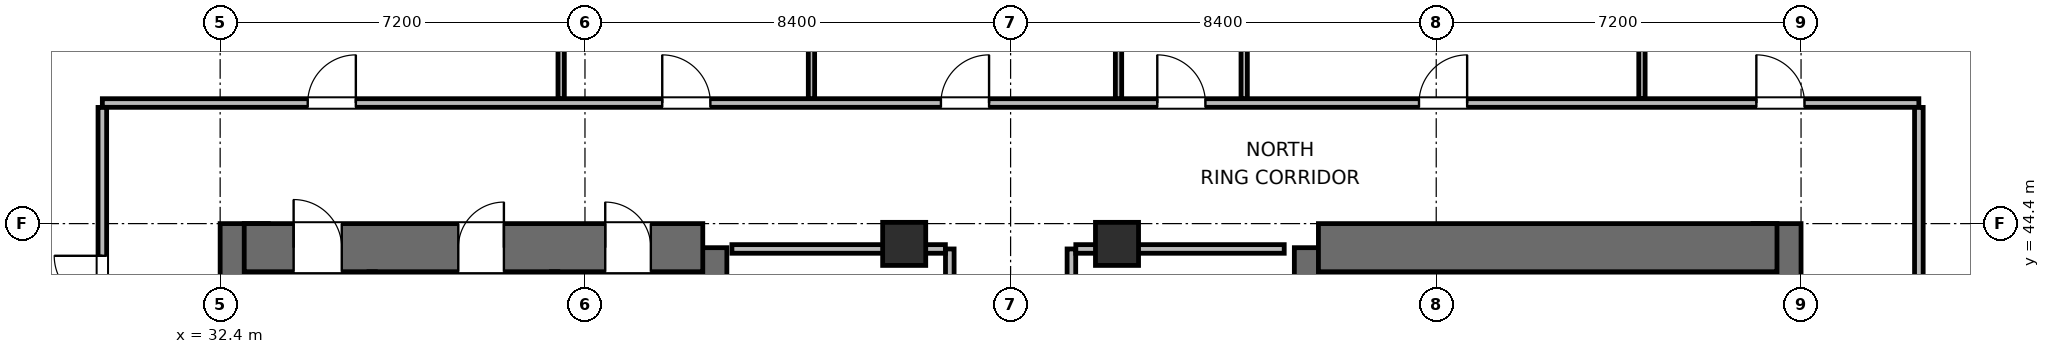
"""IFC4 building model, lengths in metres.
Left out: names, types, materials, properties, quantities, classifications, styles, units other than length and angle.
Written with IfcOpenShell. Run it as: python <this file> out.ifc"""

import sys

from ifc_helpers import new_model, si_unit, direction, frame, frame_2d, origin, origin_2d, place, context, subcontext, project, spatial, rectangle, extrude, element, fill, save


model = new_model("IFC4")
c1 = context("Model", 3, precision=1e-05, world=origin(), true_north=direction((0.0, 1.0)))
c2 = subcontext(c1, "Body", "Model", "MODEL_VIEW")
j1 = project(units=[si_unit("LENGTHUNIT", "METRE"), si_unit("PLANEANGLEUNIT", "RADIAN")], contexts=[c1])
p1 = place(None, origin())
s1 = spatial("IfcSite", under=j1, at=p1, CompositionType="ELEMENT")
p2 = place(p1, origin())
s2 = spatial("IfcBuilding", under=s1, at=p2, CompositionType="ELEMENT")
p3 = place(p2, frame((0.0, 0.0, 37.2)))
s3 = spatial("IfcBuildingStorey", under=s2, at=p3, CompositionType="ELEMENT", Elevation=37.2)
p4 = place(p3, frame((32.875, 27.6, 0.0), z_axis=(0.0, 0.0, 1.0), x_axis=(0.0, 1.0, 0.0)))
e1 = element("IfcWall", 1, at=p4, inside=s3, PredefinedType="SHEAR", context=c2, shape_type="SweptSolid", body=[
    extrude(rectangle(XDim=16.8, YDim=0.95, at=frame_2d((8.4, 0.0))), origin(), (0.0, 0.0, 1.0), 3.9),
])
p5 = place(p3, frame((41.925, 37.8, 0.0), z_axis=(0.0, 0.0, 1.0), x_axis=(0.0, 1.0, 0.0)))
e2 = element("IfcWall", 2, at=p5, inside=s3, PredefinedType="SHEAR", context=c2, shape_type="SweptSolid", body=[
    extrude(rectangle(XDim=6.125, YDim=0.95, at=frame_2d((3.062, 0.0))), origin(), (0.0, 0.0, 1.0), 3.9),
])
p6 = place(p3, frame((32.875, 43.925, 0.0), z_axis=(0.0, 0.0, 1.0), x_axis=(1.0, 0.0, 0.0)))
e3 = element("IfcWall", 3, at=p6, inside=s3, PredefinedType="SHEAR", context=c2, shape_type="SweptSolid", body=[
    extrude(rectangle(XDim=9.05, YDim=0.95, at=frame_2d((4.525, 0.0))), origin(), (0.0, 0.0, 1.0), 3.9),
])
p7 = place(p6, frame((0.975, 0.0, 0.0)))
e4 = element("IfcOpeningElement", 4, at=p7, cuts=e3, PredefinedType="OPENING", context=c2, shape_type="SweptSolid", body=[
    extrude(rectangle(XDim=0.95, YDim=2.04, at=frame_2d((0.475, 1.02))), frame((0.0, 0.485, 0.0), z_axis=(0.0, -1.0, 0.0), x_axis=(1.0, 0.0, 0.0)), (0.0, 0.0, 1.0), 0.97),
])
p8 = place(p6, frame((4.225, 0.0, 0.0)))
e5 = element("IfcOpeningElement", 5, at=p8, cuts=e3, PredefinedType="OPENING", context=c2, shape_type="SweptSolid", body=[
    extrude(rectangle(XDim=0.9, YDim=2.02, at=frame_2d((0.45, 1.01))), frame((0.0, 0.485, 0.0), z_axis=(0.0, -1.0, 0.0), x_axis=(1.0, 0.0, 0.0)), (0.0, 0.0, 1.0), 0.97),
])
p9 = place(p6, frame((7.125, 0.0, 0.0)))
e6 = element("IfcOpeningElement", 6, at=p9, cuts=e3, PredefinedType="OPENING", context=c2, shape_type="SweptSolid", body=[
    extrude(rectangle(XDim=0.9, YDim=2.02, at=frame_2d((0.45, 1.01))), frame((0.0, 0.485, 0.0), z_axis=(0.0, -1.0, 0.0), x_axis=(1.0, 0.0, 0.0)), (0.0, 0.0, 1.0), 0.97),
])
p10 = place(p3, frame((54.075, 38.0, 0.0), z_axis=(0.0, 0.0, 1.0), x_axis=(0.0, 1.0, 0.0)))
e7 = element("IfcWall", 7, at=p10, inside=s3, PredefinedType="SHEAR", context=c2, shape_type="SweptSolid", body=[
    extrude(rectangle(XDim=5.925, YDim=0.95, at=frame_2d((2.962, 0.0))), origin(), (0.0, 0.0, 1.0), 3.9),
])
p11 = place(p3, frame((63.125, 27.6, 0.0), z_axis=(0.0, 0.0, 1.0), x_axis=(0.0, 1.0, 0.0)))
e8 = element("IfcWall", 8, at=p11, inside=s3, PredefinedType="SHEAR", context=c2, shape_type="SweptSolid", body=[
    extrude(rectangle(XDim=16.8, YDim=0.95, at=frame_2d((8.4, 0.0))), origin(), (0.0, 0.0, 1.0), 3.9),
])
p12 = place(p3, frame((54.075, 43.925, 0.0), z_axis=(0.0, 0.0, 1.0), x_axis=(1.0, 0.0, 0.0)))
e9 = element("IfcWall", 9, at=p12, inside=s3, PredefinedType="SHEAR", context=c2, shape_type="SweptSolid", body=[
    extrude(rectangle(XDim=9.05, YDim=0.95, at=frame_2d((4.525, 0.0))), origin(), (0.0, 0.0, 1.0), 3.9),
])
for number, where, z_axis, x_axis in (
    (10, (45.9, 44.0, 0.0), (0.0, 0.0, 1.0), (1.0, 0.0, 0.0)),
    (11, (50.1, 44.0, 0.0), (0.0, 0.0, 1.0), (1.0, 0.0, 0.0)),
):
    element("IfcColumn", number, at=place(p3, frame(where, z_axis=z_axis, x_axis=x_axis)), inside=s3, PredefinedType="COLUMN", context=c2, shape_type="SweptSolid", body=[
        extrude(rectangle(XDim=0.85, YDim=0.85, at=origin_2d()), origin(), (0.0, 0.0, 1.0), 3.9),
    ])
for number, where, z_axis, x_axis in (
    (12, (35.4, 41.095, 0.0), (0.0, 0.0, 1.0), (0.0, 1.0, 0.0)),
    (13, (39.0, 41.095, 0.0), (0.0, 0.0, 1.0), (0.0, 1.0, 0.0)),
):
    element("IfcWall", number, at=place(p3, frame(where, z_axis=z_axis, x_axis=x_axis)), inside=s3, PredefinedType="PARTITIONING", context=c2, shape_type="SweptSolid", body=[
        extrude(rectangle(XDim=2.355, YDim=0.125, at=frame_2d((1.177, 0.0))), origin(), (0.0, 0.0, 1.0), 3.64),
    ])
p13 = place(p3, frame((46.8, 37.9, 0.0), z_axis=(0.0, 0.0, 1.0), x_axis=(0.0, 1.0, 0.0)))
e14 = element("IfcWall", 14, at=p13, inside=s3, PredefinedType="PARTITIONING", context=c2, shape_type="SweptSolid", body=[
    extrude(rectangle(XDim=6.0, YDim=0.17, at=frame_2d((3.0, 0.0))), origin(), (0.0, 0.0, 1.0), 3.64),
])
p14 = place(p13, frame((0.54, 0.0, 0.0)))
e15 = element("IfcOpeningElement", 15, at=p14, cuts=e14, PredefinedType="OPENING", context=c2, shape_type="SweptSolid", body=[
    extrude(rectangle(XDim=0.9, YDim=2.02, at=frame_2d((0.45, 1.01))), frame((0.0, 0.095, 0.0), z_axis=(0.0, -1.0, 0.0), x_axis=(1.0, 0.0, 0.0)), (0.0, 0.0, 1.0), 0.19),
])
p15 = place(p13, frame((2.55, 0.0, 0.0)))
e16 = element("IfcOpeningElement", 16, at=p15, cuts=e14, PredefinedType="OPENING", context=c2, shape_type="SweptSolid", body=[
    extrude(rectangle(XDim=0.9, YDim=2.02, at=frame_2d((0.45, 1.01))), frame((0.0, 0.095, 0.0), z_axis=(0.0, -1.0, 0.0), x_axis=(1.0, 0.0, 0.0)), (0.0, 0.0, 1.0), 0.19),
])
p16 = place(p13, frame((4.56, 0.0, 0.0)))
e17 = element("IfcOpeningElement", 17, at=p16, cuts=e14, PredefinedType="OPENING", context=c2, shape_type="SweptSolid", body=[
    extrude(rectangle(XDim=0.9, YDim=2.02, at=frame_2d((0.45, 1.01))), frame((0.0, 0.095, 0.0), z_axis=(0.0, -1.0, 0.0), x_axis=(1.0, 0.0, 0.0)), (0.0, 0.0, 1.0), 0.19),
])
p17 = place(p3, frame((42.5, 43.9, 0.0), z_axis=(0.0, 0.0, 1.0), x_axis=(1.0, 0.0, 0.0)))
e18 = element("IfcWall", 18, at=p17, inside=s3, PredefinedType="PARTITIONING", context=c2, shape_type="SweptSolid", body=[
    extrude(rectangle(XDim=4.213, YDim=0.17, at=frame_2d((2.106, 0.0))), origin(), (0.0, 0.0, 1.0), 2.525),
])
p18 = place(p3, frame((49.2, 37.9, 0.0), z_axis=(0.0, 0.0, 1.0), x_axis=(0.0, 1.0, 0.0)))
e19 = element("IfcWall", 19, at=p18, inside=s3, PredefinedType="PARTITIONING", context=c2, shape_type="SweptSolid", body=[
    extrude(rectangle(XDim=6.0, YDim=0.17, at=frame_2d((3.0, 0.0))), origin(), (0.0, 0.0, 1.0), 3.64),
])
p19 = place(p18, frame((0.69, 0.0, 0.0)))
e20 = element("IfcOpeningElement", 20, at=p19, cuts=e19, PredefinedType="OPENING", context=c2, shape_type="SweptSolid", body=[
    extrude(rectangle(XDim=0.9, YDim=2.02, at=frame_2d((0.45, 1.01))), frame((0.0, 0.095, 0.0), z_axis=(0.0, -1.0, 0.0), x_axis=(1.0, 0.0, 0.0)), (0.0, 0.0, 1.0), 0.19),
])
p20 = place(p18, frame((3.69, 0.0, 0.0)))
e21 = element("IfcOpeningElement", 21, at=p20, cuts=e19, PredefinedType="OPENING", context=c2, shape_type="SweptSolid", body=[
    extrude(rectangle(XDim=0.9, YDim=2.02, at=frame_2d((0.45, 1.01))), frame((0.0, 0.095, 0.0), z_axis=(0.0, -1.0, 0.0), x_axis=(1.0, 0.0, 0.0)), (0.0, 0.0, 1.0), 0.19),
])
p21 = place(p3, frame((49.287, 43.9, 0.0), z_axis=(0.0, 0.0, 1.0), x_axis=(1.0, 0.0, 0.0)))
e22 = element("IfcWall", 22, at=p21, inside=s3, PredefinedType="PARTITIONING", context=c2, shape_type="SweptSolid", body=[
    extrude(rectangle(XDim=4.113, YDim=0.17, at=frame_2d((2.056, 0.0))), origin(), (0.0, 0.0, 1.0), 2.525),
])
p22 = place(p3, frame((30.075, 46.78, 0.0), z_axis=(0.0, 0.0, 1.0), x_axis=(1.0, 0.0, 0.0)))
e23 = element("IfcWall", 23, at=p22, inside=s3, PredefinedType="PARTITIONING", context=c2, shape_type="SweptSolid", body=[
    extrude(rectangle(XDim=35.85, YDim=0.17, at=frame_2d((17.925, 0.0))), origin(), (0.0, 0.0, 1.0), 3.64),
])
p23 = place(p22, frame((4.053, 0.0, 0.0)))
e24 = element("IfcOpeningElement", 24, at=p23, cuts=e23, PredefinedType="OPENING", context=c2, shape_type="SweptSolid", body=[
    extrude(rectangle(XDim=0.95, YDim=2.04, at=frame_2d((0.475, 1.02))), frame((0.0, 0.095, 0.0), z_axis=(0.0, -1.0, 0.0), x_axis=(1.0, 0.0, 0.0)), (0.0, 0.0, 1.0), 0.19),
])
p24 = place(p22, frame((11.05, 0.0, 0.0)))
e25 = element("IfcOpeningElement", 25, at=p24, cuts=e23, PredefinedType="OPENING", context=c2, shape_type="SweptSolid", body=[
    extrude(rectangle(XDim=0.95, YDim=2.04, at=frame_2d((0.475, 1.02))), frame((0.0, 0.095, 0.0), z_axis=(0.0, -1.0, 0.0), x_axis=(1.0, 0.0, 0.0)), (0.0, 0.0, 1.0), 0.19),
])
p25 = place(p22, frame((16.55, 0.0, 0.0)))
e26 = element("IfcOpeningElement", 26, at=p25, cuts=e23, PredefinedType="OPENING", context=c2, shape_type="SweptSolid", body=[
    extrude(rectangle(XDim=0.95, YDim=2.04, at=frame_2d((0.475, 1.02))), frame((0.0, 0.095, 0.0), z_axis=(0.0, -1.0, 0.0), x_axis=(1.0, 0.0, 0.0)), (0.0, 0.0, 1.0), 0.19),
])
p26 = place(p22, frame((20.82, 0.0, 0.0)))
e27 = element("IfcOpeningElement", 27, at=p26, cuts=e23, PredefinedType="OPENING", context=c2, shape_type="SweptSolid", body=[
    extrude(rectangle(XDim=0.95, YDim=2.04, at=frame_2d((0.475, 1.02))), frame((0.0, 0.095, 0.0), z_axis=(0.0, -1.0, 0.0), x_axis=(1.0, 0.0, 0.0)), (0.0, 0.0, 1.0), 0.19),
])
p27 = place(p22, frame((25.985, 0.0, 0.0)))
e28 = element("IfcOpeningElement", 28, at=p27, cuts=e23, PredefinedType="OPENING", context=c2, shape_type="SweptSolid", body=[
    extrude(rectangle(XDim=0.95, YDim=2.04, at=frame_2d((0.475, 1.02))), frame((0.0, 0.095, 0.0), z_axis=(0.0, -1.0, 0.0), x_axis=(1.0, 0.0, 0.0)), (0.0, 0.0, 1.0), 0.19),
])
p28 = place(p22, frame((32.643, 0.0, 0.0)))
e29 = element("IfcOpeningElement", 29, at=p28, cuts=e23, PredefinedType="OPENING", context=c2, shape_type="SweptSolid", body=[
    extrude(rectangle(XDim=0.95, YDim=2.04, at=frame_2d((0.475, 1.02))), frame((0.0, 0.095, 0.0), z_axis=(0.0, -1.0, 0.0), x_axis=(1.0, 0.0, 0.0)), (0.0, 0.0, 1.0), 0.19),
])
p29 = place(p3, frame((30.075, 25.307, 0.0), z_axis=(0.0, 0.0, 1.0), x_axis=(0.0, 1.0, 0.0)))
e30 = element("IfcWall", 30, at=p29, inside=s3, PredefinedType="PARTITIONING", context=c2, shape_type="SweptSolid", body=[
    extrude(rectangle(XDim=21.386, YDim=0.17, at=frame_2d((10.693, 0.0))), origin(), (0.0, 0.0, 1.0), 3.64),
])
p30 = place(p29, frame((3.528, 0.0, 0.0)))
e31 = element("IfcOpeningElement", 31, at=p30, cuts=e30, PredefinedType="OPENING", context=c2, shape_type="SweptSolid", body=[
    extrude(rectangle(XDim=0.95, YDim=2.04, at=frame_2d((0.475, 1.02))), frame((0.0, 0.095, 0.0), z_axis=(0.0, -1.0, 0.0), x_axis=(1.0, 0.0, 0.0)), (0.0, 0.0, 1.0), 0.19),
])
p31 = place(p29, frame((10.818, 0.0, 0.0)))
e32 = element("IfcOpeningElement", 32, at=p31, cuts=e30, PredefinedType="OPENING", context=c2, shape_type="SweptSolid", body=[
    extrude(rectangle(XDim=0.95, YDim=2.04, at=frame_2d((0.475, 1.02))), frame((0.0, 0.095, 0.0), z_axis=(0.0, -1.0, 0.0), x_axis=(1.0, 0.0, 0.0)), (0.0, 0.0, 1.0), 0.19),
])
p32 = place(p29, frame((17.508, 0.0, 0.0)))
e33 = element("IfcOpeningElement", 33, at=p32, cuts=e30, PredefinedType="OPENING", context=c2, shape_type="SweptSolid", body=[
    extrude(rectangle(XDim=0.95, YDim=2.04, at=frame_2d((0.475, 1.02))), frame((0.0, 0.095, 0.0), z_axis=(0.0, -1.0, 0.0), x_axis=(1.0, 0.0, 0.0)), (0.0, 0.0, 1.0), 0.19),
])
p33 = place(p3, frame((65.925, 25.307, 0.0), z_axis=(0.0, 0.0, 1.0), x_axis=(0.0, 1.0, 0.0)))
e34 = element("IfcWall", 34, at=p33, inside=s3, PredefinedType="PARTITIONING", context=c2, shape_type="SweptSolid", body=[
    extrude(rectangle(XDim=21.386, YDim=0.17, at=frame_2d((10.693, 0.0))), origin(), (0.0, 0.0, 1.0), 3.64),
])
p34 = place(p33, frame((5.428, 0.0, 0.0)))
e35 = element("IfcOpeningElement", 35, at=p34, cuts=e34, PredefinedType="OPENING", context=c2, shape_type="SweptSolid", body=[
    extrude(rectangle(XDim=0.95, YDim=2.04, at=frame_2d((0.475, 1.02))), frame((0.0, 0.095, 0.0), z_axis=(0.0, -1.0, 0.0), x_axis=(1.0, 0.0, 0.0)), (0.0, 0.0, 1.0), 0.19),
])
p35 = place(p33, frame((16.208, 0.0, 0.0)))
e36 = element("IfcOpeningElement", 36, at=p35, cuts=e34, PredefinedType="OPENING", context=c2, shape_type="SweptSolid", body=[
    extrude(rectangle(XDim=0.95, YDim=2.04, at=frame_2d((0.475, 1.02))), frame((0.0, 0.095, 0.0), z_axis=(0.0, -1.0, 0.0), x_axis=(1.0, 0.0, 0.0)), (0.0, 0.0, 1.0), 0.19),
])
p36 = place(p3, frame((39.13, 46.867, 0.0), z_axis=(0.0, 0.0, 1.0), x_axis=(0.0, 1.0, 0.0)))
e37 = element("IfcWall", 37, at=p36, inside=s3, PredefinedType="PARTITIONING", context=c2, shape_type="SweptSolid", body=[
    extrude(rectangle(XDim=15.288, YDim=0.125, at=frame_2d((7.644, 0.0))), origin(), (0.0, 0.0, 1.0), 3.64),
])
p37 = place(p3, frame((44.07, 46.867, 0.0), z_axis=(0.0, 0.0, 1.0), x_axis=(0.0, 1.0, 0.0)))
e38 = element("IfcWall", 38, at=p37, inside=s3, PredefinedType="PARTITIONING", context=c2, shape_type="SweptSolid", body=[
    extrude(rectangle(XDim=13.618, YDim=0.125, at=frame_2d((6.809, 0.0))), origin(), (0.0, 0.0, 1.0), 3.003),
])
p38 = place(p3, frame((50.13, 46.867, 0.0), z_axis=(0.0, 0.0, 1.0), x_axis=(0.0, 1.0, 0.0)))
e39 = element("IfcWall", 39, at=p38, inside=s3, PredefinedType="PARTITIONING", context=c2, shape_type="SweptSolid", body=[
    extrude(rectangle(XDim=11.558, YDim=0.125, at=frame_2d((5.779, 0.0))), origin(), (0.0, 0.0, 1.0), 3.64),
])
p39 = place(p3, frame((52.61, 46.867, 0.0), z_axis=(0.0, 0.0, 1.0), x_axis=(0.0, 1.0, 0.0)))
e40 = element("IfcWall", 40, at=p39, inside=s3, PredefinedType="PARTITIONING", context=c2, shape_type="SweptSolid", body=[
    extrude(rectangle(XDim=11.558, YDim=0.125, at=frame_2d((5.779, 0.0))), origin(), (0.0, 0.0, 1.0), 3.003),
])
p40 = place(p3, frame((60.46, 46.867, 0.0), z_axis=(0.0, 0.0, 1.0), x_axis=(0.0, 1.0, 0.0)))
e41 = element("IfcWall", 41, at=p40, inside=s3, PredefinedType="PARTITIONING", context=c2, shape_type="SweptSolid", body=[
    extrude(rectangle(XDim=15.218, YDim=0.125, at=frame_2d((7.609, 0.0))), origin(), (0.0, 0.0, 1.0), 3.64),
])
p41 = place(p7, origin())
e42 = element("IfcDoor", 42, at=p41, inside=s3, OperationType="SINGLE_SWING_LEFT", PredefinedType="DOOR", context=c2, shape_type="SweptSolid", body=[
    extrude(rectangle(XDim=0.95, YDim=2.04, at=frame_2d((0.475, 1.02))), frame((0.0, 0.025, 0.0), z_axis=(0.0, -1.0, 0.0), x_axis=(1.0, 0.0, 0.0)), (0.0, 0.0, 1.0), 0.05),
])
fill(e4, e42)
p42 = place(p8, origin())
e43 = element("IfcDoor", 43, at=p42, inside=s3, OperationType="SINGLE_SWING_RIGHT", PredefinedType="DOOR", context=c2, shape_type="SweptSolid", body=[
    extrude(rectangle(XDim=0.9, YDim=2.02, at=frame_2d((0.45, 1.01))), frame((0.0, 0.025, 0.0), z_axis=(0.0, -1.0, 0.0), x_axis=(1.0, 0.0, 0.0)), (0.0, 0.0, 1.0), 0.05),
])
fill(e5, e43)
p43 = place(p9, origin())
e44 = element("IfcDoor", 44, at=p43, inside=s3, OperationType="SINGLE_SWING_LEFT", PredefinedType="DOOR", context=c2, shape_type="SweptSolid", body=[
    extrude(rectangle(XDim=0.9, YDim=2.02, at=frame_2d((0.45, 1.01))), frame((0.0, 0.025, 0.0), z_axis=(0.0, -1.0, 0.0), x_axis=(1.0, 0.0, 0.0)), (0.0, 0.0, 1.0), 0.05),
])
fill(e6, e44)
p44 = place(p23, origin())
e45 = element("IfcDoor", 45, at=p44, inside=s3, OperationType="SINGLE_SWING_RIGHT", PredefinedType="DOOR", context=c2, shape_type="SweptSolid", body=[
    extrude(rectangle(XDim=0.95, YDim=2.04, at=frame_2d((0.475, 1.02))), frame((0.0, 0.025, 0.0), z_axis=(0.0, -1.0, 0.0), x_axis=(1.0, 0.0, 0.0)), (0.0, 0.0, 1.0), 0.05),
])
fill(e24, e45)
p45 = place(p24, origin())
e46 = element("IfcDoor", 46, at=p45, inside=s3, OperationType="SINGLE_SWING_LEFT", PredefinedType="DOOR", context=c2, shape_type="SweptSolid", body=[
    extrude(rectangle(XDim=0.95, YDim=2.04, at=frame_2d((0.475, 1.02))), frame((0.0, 0.025, 0.0), z_axis=(0.0, -1.0, 0.0), x_axis=(1.0, 0.0, 0.0)), (0.0, 0.0, 1.0), 0.05),
])
fill(e25, e46)
p46 = place(p25, origin())
e47 = element("IfcDoor", 47, at=p46, inside=s3, OperationType="SINGLE_SWING_RIGHT", PredefinedType="DOOR", context=c2, shape_type="SweptSolid", body=[
    extrude(rectangle(XDim=0.95, YDim=2.04, at=frame_2d((0.475, 1.02))), frame((0.0, 0.025, 0.0), z_axis=(0.0, -1.0, 0.0), x_axis=(1.0, 0.0, 0.0)), (0.0, 0.0, 1.0), 0.05),
])
fill(e26, e47)
p47 = place(p26, origin())
e48 = element("IfcDoor", 48, at=p47, inside=s3, OperationType="SINGLE_SWING_LEFT", PredefinedType="DOOR", context=c2, shape_type="SweptSolid", body=[
    extrude(rectangle(XDim=0.95, YDim=2.04, at=frame_2d((0.475, 1.02))), frame((0.0, 0.025, 0.0), z_axis=(0.0, -1.0, 0.0), x_axis=(1.0, 0.0, 0.0)), (0.0, 0.0, 1.0), 0.05),
])
fill(e27, e48)
p48 = place(p27, origin())
e49 = element("IfcDoor", 49, at=p48, inside=s3, OperationType="SINGLE_SWING_RIGHT", PredefinedType="DOOR", context=c2, shape_type="SweptSolid", body=[
    extrude(rectangle(XDim=0.95, YDim=2.04, at=frame_2d((0.475, 1.02))), frame((0.0, 0.025, 0.0), z_axis=(0.0, -1.0, 0.0), x_axis=(1.0, 0.0, 0.0)), (0.0, 0.0, 1.0), 0.05),
])
fill(e28, e49)
p49 = place(p28, origin())
e50 = element("IfcDoor", 50, at=p49, inside=s3, OperationType="SINGLE_SWING_LEFT", PredefinedType="DOOR", context=c2, shape_type="SweptSolid", body=[
    extrude(rectangle(XDim=0.95, YDim=2.04, at=frame_2d((0.475, 1.02))), frame((0.0, 0.025, 0.0), z_axis=(0.0, -1.0, 0.0), x_axis=(1.0, 0.0, 0.0)), (0.0, 0.0, 1.0), 0.05),
])
fill(e29, e50)
p50 = place(p32, origin())
e51 = element("IfcDoor", 51, at=p50, inside=s3, OperationType="SINGLE_SWING_RIGHT", PredefinedType="DOOR", context=c2, shape_type="SweptSolid", body=[
    extrude(rectangle(XDim=0.95, YDim=2.04, at=frame_2d((0.475, 1.02))), frame((0.0, 0.025, 0.0), z_axis=(0.0, -1.0, 0.0), x_axis=(1.0, 0.0, 0.0)), (0.0, 0.0, 1.0), 0.05),
])
fill(e33, e51)
save(model, sys.argv[1])
